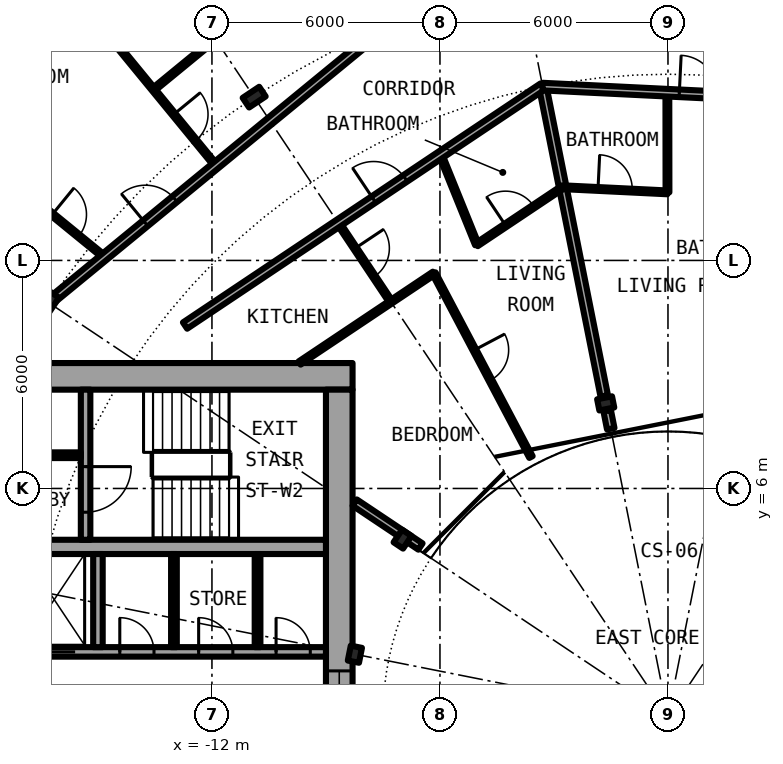
"""IFC4 building model, lengths in metres.
Left out: names, types, materials, properties, quantities, classifications, styles, units other than length and angle.
Written with IfcOpenShell. Run it as: python <this file> out.ifc"""

import sys

from ifc_helpers import new_model, si_unit, direction, frame, frame_2d, origin, origin_2d, place, context, subcontext, project, spatial, rectangle, i_section, extrude, element, fill, save


model = new_model("IFC4")
c1 = context("Model", 3, precision=1e-05, world=origin(), true_north=direction((0.0, 1.0)))
c2 = subcontext(c1, "Body", "Model", "MODEL_VIEW")
j1 = project(units=[si_unit("LENGTHUNIT", "METRE"), si_unit("PLANEANGLEUNIT", "RADIAN")], contexts=[c1])
p1 = place(None, origin())
s1 = spatial("IfcSite", under=j1, at=p1, CompositionType="ELEMENT")
p2 = place(p1, origin())
s2 = spatial("IfcBuilding", under=s1, at=p2, CompositionType="ELEMENT")
p3 = place(p2, frame((0.0, 0.0, 91.05)))
s3 = spatial("IfcBuildingStorey", under=s2, at=p3, CompositionType="ELEMENT", Elevation=91.05)
for number, where, z_axis, x_axis in (
    (1, (-10.889, 16.297, 0.0), (0.0, 0.0, 1.0), (-0.556, 0.831, 0.0)),
    (2, (-16.297, 10.889, 0.0), (0.0, 0.0, 1.0), (-0.831, 0.556, 0.0)),
):
    element("IfcColumn", number, at=place(p3, frame(where, z_axis=z_axis, x_axis=x_axis)), inside=s3, PredefinedType="COLUMN", context=c2, shape_type="SweptSolid", body=[
        extrude(i_section(OverallWidth=0.306, OverallDepth=0.524, WebThickness=0.021, FlangeThickness=0.04, FilletRadius=0.027, at=origin_2d()), origin(), (0.0, 0.0, 1.0), 3.05),
    ])
for number, where, z_axis, x_axis in (
    (3, (-1.639, 8.239, 0.0), (0.0, 0.0, 1.0), (-0.195, 0.981, 0.0)),
    (4, (-6.984, 4.667, 0.0), (0.0, 0.0, 1.0), (-0.831, 0.556, 0.0)),
    (5, (-8.239, 1.639, 0.0), (0.0, 0.0, 1.0), (-0.981, 0.195, 0.0)),
):
    element("IfcColumn", number, at=place(p3, frame(where, z_axis=z_axis, x_axis=x_axis)), inside=s3, PredefinedType="COLUMN", context=c2, shape_type="SweptSolid", body=[
        extrude(i_section(OverallWidth=0.3, OverallDepth=0.4, WebThickness=0.013, FlangeThickness=0.024, FilletRadius=0.027, at=origin_2d()), origin(), (0.0, 0.0, 1.0), 3.05),
    ])
p4 = place(p3, frame((-8.3, 8.95, 0.0), z_axis=(0.0, 0.0, 1.0), x_axis=(-1.0, 0.0, 0.0)))
e6 = element("IfcWall", 6, at=p4, inside=s3, PredefinedType="SHEAR", context=c2, shape_type="SweptSolid", body=[
    extrude(rectangle(XDim=14.0, YDim=0.7, at=frame_2d((7.0, 0.0))), origin(), (0.0, 0.0, 1.0), 3.05),
])
p5 = place(p4, frame((11.575, 0.0, 0.0)))
e7 = element("IfcOpeningElement", 7, at=p5, cuts=e6, PredefinedType="OPENING", context=c2, shape_type="SweptSolid", body=[
    extrude(rectangle(XDim=1.2, YDim=2.3, at=frame_2d((0.6, 1.15))), frame((0.0, 0.36, 0.0), z_axis=(0.0, -1.0, 0.0), x_axis=(1.0, 0.0, 0.0)), (0.0, 0.0, 1.0), 0.72),
])
p6 = place(p3, frame((-8.65, 8.6, 0.0), z_axis=(0.0, 0.0, 1.0), x_axis=(0.0, -1.0, 0.0)))
e8 = element("IfcWall", 8, at=p6, inside=s3, PredefinedType="SHEAR", context=c2, shape_type="SweptSolid", body=[
    extrude(rectangle(XDim=17.2, YDim=0.7, at=frame_2d((8.6, 0.0))), origin(), (0.0, 0.0, 1.0), 3.05),
])
p7 = place(p6, frame((7.4, 0.0, 0.1)))
e9 = element("IfcOpeningElement", 9, at=p7, cuts=e8, PredefinedType="OPENING", context=c2, shape_type="SweptSolid", body=[
    extrude(rectangle(XDim=2.4, YDim=2.2, at=frame_2d((1.2, 1.1))), frame((0.0, 0.36, 0.0), z_axis=(0.0, -1.0, 0.0), x_axis=(1.0, 0.0, 0.0)), (0.0, 0.0, 1.0), 0.72),
])
p8 = place(p3, frame((-19.15, 1.7, 0.0), z_axis=(0.0, 0.0, 1.0), x_axis=(1.0, 0.0, 0.0)))
e10 = element("IfcWall", 10, at=p8, inside=s3, PredefinedType="SHEAR", context=c2, shape_type="SweptSolid", body=[
    extrude(rectangle(XDim=10.15, YDim=0.25, at=frame_2d((5.075, 0.0))), origin(), (0.0, 0.0, 1.0), 3.05),
])
p9 = place(p8, frame((2.45, 0.0, 0.0)))
e11 = element("IfcOpeningElement", 11, at=p9, cuts=e10, PredefinedType="OPENING", context=c2, shape_type="SweptSolid", body=[
    extrude(rectangle(XDim=1.1, YDim=2.3, at=frame_2d((0.55, 1.15))), frame((0.0, 0.135, 0.0), z_axis=(0.0, -1.0, 0.0), x_axis=(1.0, 0.0, 0.0)), (0.0, 0.0, 1.0), 0.27),
])
p10 = place(p8, frame((8.837, 0.0, 0.0)))
e12 = element("IfcOpeningElement", 12, at=p10, cuts=e10, PredefinedType="OPENING", context=c2, shape_type="SweptSolid", body=[
    extrude(rectangle(XDim=0.9, YDim=2.3, at=frame_2d((0.45, 1.15))), frame((0.0, 0.135, 0.0), z_axis=(0.0, -1.0, 0.0), x_axis=(1.0, 0.0, 0.0)), (0.0, 0.0, 1.0), 0.27),
])
p11 = place(p8, frame((6.8, 0.0, 0.0)))
e13 = element("IfcOpeningElement", 13, at=p11, cuts=e10, PredefinedType="OPENING", context=c2, shape_type="SweptSolid", body=[
    extrude(rectangle(XDim=0.9, YDim=2.3, at=frame_2d((0.45, 1.15))), frame((0.0, 0.135, 0.0), z_axis=(0.0, -1.0, 0.0), x_axis=(1.0, 0.0, 0.0)), (0.0, 0.0, 1.0), 0.27),
])
p12 = place(p8, frame((4.725, 0.0, 0.0)))
e14 = element("IfcOpeningElement", 14, at=p12, cuts=e10, PredefinedType="OPENING", context=c2, shape_type="SweptSolid", body=[
    extrude(rectangle(XDim=0.9, YDim=2.3, at=frame_2d((0.45, 1.15))), frame((0.0, 0.135, 0.0), z_axis=(0.0, -1.0, 0.0), x_axis=(1.0, 0.0, 0.0)), (0.0, 0.0, 1.0), 0.27),
])
p13 = place(p3, frame((-9.0, 4.462, 0.0), z_axis=(0.0, 0.0, 1.0), x_axis=(-1.0, 0.0, 0.0)))
e15 = element("IfcWall", 15, at=p13, inside=s3, PredefinedType="SHEAR", context=c2, shape_type="SweptSolid", body=[
    extrude(rectangle(XDim=10.15, YDim=0.375, at=frame_2d((5.075, 0.0))), origin(), (0.0, 0.0, 1.0), 3.05),
])
p14 = place(p3, frame((-15.325, 8.6, 0.0), z_axis=(0.0, 0.0, 1.0), x_axis=(0.0, -1.0, 0.0)))
e16 = element("IfcWall", 16, at=p14, inside=s3, PredefinedType="SHEAR", context=c2, shape_type="SweptSolid", body=[
    extrude(rectangle(XDim=3.95, YDim=0.25, at=frame_2d((1.975, 0.0))), origin(), (0.0, 0.0, 1.0), 3.05),
])
p15 = place(p14, frame((2.025, 0.0, 0.0)))
e17 = element("IfcOpeningElement", 17, at=p15, cuts=e16, PredefinedType="OPENING", context=c2, shape_type="SweptSolid", body=[
    extrude(rectangle(XDim=1.2, YDim=2.3, at=frame_2d((0.6, 1.15))), frame((0.0, 0.135, 0.0), z_axis=(0.0, -1.0, 0.0), x_axis=(1.0, 0.0, 0.0)), (0.0, 0.0, 1.0), 0.27),
])
p16 = place(p3, frame((-15.0, 1.825, 0.0), z_axis=(0.0, 0.0, 1.0), x_axis=(0.0, 1.0, 0.0)))
e18 = element("IfcWall", 18, at=p16, inside=s3, PredefinedType="SOLIDWALL", context=c2, shape_type="SweptSolid", body=[
    extrude(rectangle(XDim=2.45, YDim=0.25, at=frame_2d((1.225, 0.0))), origin(), (0.0, 0.0, 1.0), 2.7),
])
for number, where, z_axis, x_axis in (
    (19, (-10.8, 1.825, 0.0), (0.0, 0.0, 1.0), (0.0, 1.0, 0.0)),
    (20, (-13.0, 1.825, 0.0), (0.0, 0.0, 1.0), (0.0, 1.0, 0.0)),
):
    element("IfcWall", number, at=place(p3, frame(where, z_axis=z_axis, x_axis=x_axis)), inside=s3, PredefinedType="PARTITIONING", context=c2, shape_type="SweptSolid", body=[
        extrude(rectangle(XDim=2.45, YDim=0.15, at=frame_2d((1.225, 0.0))), origin(), (0.0, 0.0, 1.0), 2.7),
    ])
p17 = place(p3, frame((-15.45, 6.875, 0.0), z_axis=(0.0, 0.0, 1.0), x_axis=(-1.0, 0.0, 0.0)))
e21 = element("IfcWall", 21, at=p17, inside=s3, PredefinedType="PARTITIONING", context=c2, shape_type="SweptSolid", body=[
    extrude(rectangle(XDim=3.7, YDim=0.15, at=frame_2d((1.85, 0.0))), origin(), (0.0, 0.0, 1.0), 2.7),
])
p18 = place(p17, frame((1.4, 0.0, 0.0)))
e22 = element("IfcOpeningElement", 22, at=p18, cuts=e21, PredefinedType="OPENING", context=c2, shape_type="SweptSolid", body=[
    extrude(rectangle(XDim=0.9, YDim=2.3, at=frame_2d((0.45, 1.15))), frame((0.0, 0.085, 0.0), z_axis=(0.0, -1.0, 0.0), x_axis=(1.0, 0.0, 0.0)), (0.0, 0.0, 1.0), 0.17),
])
p19 = place(p3, frame((-17.24, 21.007, 0.0), z_axis=(0.0, 0.0, 1.0), x_axis=(0.634396151441, -0.77300810024, 0.0)))
e23 = element("IfcWall", 23, at=p19, inside=s3, PredefinedType="PARTITIONING", context=c2, shape_type="SweptSolid", body=[
    extrude(rectangle(XDim=8.419, YDim=0.1, at=frame_2d((4.209, 0.0))), origin(), (0.0, 0.0, 1.0), 2.7),
])
p20 = place(p19, frame((6.679, 0.0, 0.0)))
e24 = element("IfcOpeningElement", 24, at=p20, cuts=e23, PredefinedType="OPENING", context=c2, shape_type="SweptSolid", body=[
    extrude(rectangle(XDim=0.9, YDim=2.3, at=frame_2d((0.45, 1.15))), frame((0.0, 0.06, 0.0), z_axis=(0.0, -1.0, 0.0), x_axis=(1.0, 0.0, 0.0)), (0.0, 0.0, 1.0), 0.12),
])
p21 = place(p19, frame((2.468, 0.0, 0.0)))
e25 = element("IfcOpeningElement", 25, at=p21, cuts=e23, PredefinedType="OPENING", context=c2, shape_type="SweptSolid", body=[
    extrude(rectangle(XDim=0.9, YDim=2.3, at=frame_2d((0.45, 1.15))), frame((0.0, 0.06, 0.0), z_axis=(0.0, -1.0, 0.0), x_axis=(1.0, 0.0, 0.0)), (0.0, 0.0, 1.0), 0.12),
])
p22 = place(p3, frame((-16.874, 13.758, 0.0), z_axis=(0.0, 0.0, 1.0), x_axis=(0.774979608522, -0.631986239072, 0.0)))
e26 = element("IfcWall", 26, at=p22, inside=s3, PredefinedType="PARTITIONING", context=c2, shape_type="SweptSolid", body=[
    extrude(rectangle(XDim=2.636, YDim=0.1, at=frame_2d((1.318, 0.0))), origin(), (0.0, 0.0, 1.0), 2.7),
])
p23 = place(p22, frame((0.868, 0.0, 0.0)))
e27 = element("IfcOpeningElement", 27, at=p23, cuts=e26, PredefinedType="OPENING", context=c2, shape_type="SweptSolid", body=[
    extrude(rectangle(XDim=0.9, YDim=2.3, at=frame_2d((0.45, 1.15))), frame((0.0, 0.06, 0.0), z_axis=(0.0, -1.0, 0.0), x_axis=(1.0, 0.0, 0.0)), (0.0, 0.0, 1.0), 0.12),
])
p24 = place(p3, frame((-8.674, 12.982, 0.0), z_axis=(0.0, 0.0, 1.0), x_axis=(0.555355163998, -0.831613276602, 0.0)))
e28 = element("IfcWall", 28, at=p24, inside=s3, PredefinedType="PARTITIONING", context=c2, shape_type="SweptSolid", body=[
    extrude(rectangle(XDim=2.494, YDim=0.1, at=frame_2d((1.247, 0.0))), origin(), (0.0, 0.0, 1.0), 2.7),
])
p25 = place(p24, frame((0.797, 0.0, 0.0)))
e29 = element("IfcOpeningElement", 29, at=p25, cuts=e28, PredefinedType="OPENING", context=c2, shape_type="SweptSolid", body=[
    extrude(rectangle(XDim=0.9, YDim=2.3, at=frame_2d((0.45, 1.15))), frame((0.0, 0.06, 0.0), z_axis=(0.0, -1.0, 0.0), x_axis=(1.0, 0.0, 0.0)), (0.0, 0.0, 1.0), 0.12),
])
p26 = place(p3, frame((-6.159, 11.663, 0.0), z_axis=(0.0, 0.0, 1.0), x_axis=(0.466976820365, -0.884269556889, 0.0)))
e30 = element("IfcWall", 30, at=p26, inside=s3, PredefinedType="PARTITIONING", context=c2, shape_type="SweptSolid", body=[
    extrude(rectangle(XDim=5.469, YDim=0.1, at=frame_2d((2.735, 0.0))), origin(), (0.0, 0.0, 1.0), 2.7),
])
p27 = place(p26, frame((2.284, 0.0, 0.0)))
e31 = element("IfcOpeningElement", 31, at=p27, cuts=e30, PredefinedType="OPENING", context=c2, shape_type="SweptSolid", body=[
    extrude(rectangle(XDim=0.9, YDim=2.3, at=frame_2d((0.45, 1.15))), frame((0.0, 0.06, 0.0), z_axis=(0.0, -1.0, 0.0), x_axis=(1.0, 0.0, 0.0)), (0.0, 0.0, 1.0), 0.12),
])
p28 = place(p3, frame((-5.986, 14.779, 0.0), z_axis=(0.0, 0.0, 1.0), x_axis=(0.375649498413, -0.926761811008, 0.0)))
e32 = element("IfcWall", 32, at=p28, inside=s3, PredefinedType="PARTITIONING", context=c2, shape_type="SweptSolid", body=[
    extrude(rectangle(XDim=2.548, YDim=0.1, at=frame_2d((1.274, 0.0))), origin(), (0.0, 0.0, 1.0), 2.7),
])
p29 = place(p3, frame((-3.297, 16.575, 0.0), z_axis=(0.0, 0.0, 1.0), x_axis=(0.195205282633, -0.980762406311, 0.0)))
e33 = element("IfcWall", 33, at=p29, inside=s3, PredefinedType="PARTITIONING", context=c2, shape_type="SweptSolid", body=[
    extrude(rectangle(XDim=8.3, YDim=0.2, at=frame_2d((4.15, 0.0))), origin(), (0.0, 0.0, 1.0), 2.7),
])
p30 = place(p3, frame((-1.599, 8.043, 0.0), z_axis=(0.0, 0.0, 1.0), x_axis=(0.193768289311, -0.981047323047, 0.0)))
e34 = element("IfcWall", 34, at=p30, inside=s3, PredefinedType="PARTITIONING", context=c2, shape_type="SweptSolid", body=[
    extrude(rectangle(XDim=0.48, YDim=0.2, at=frame_2d((0.24, 0.0))), origin(), (0.0, 0.0, 1.0), 2.7),
])
p31 = place(p3, frame((-0.013, 13.792, 0.0), z_axis=(0.0, 0.0, 1.0), x_axis=(-0.001210427419, 0.999999267432, 0.0)))
e35 = element("IfcWall", 35, at=p31, inside=s3, PredefinedType="PARTITIONING", context=c2, shape_type="SweptSolid", body=[
    extrude(rectangle(XDim=2.622, YDim=0.1, at=frame_2d((1.311, 0.0))), origin(), (0.0, 0.0, 1.0), 2.7),
])
p32 = place(p3, frame((-6.513, 4.472, 0.0), z_axis=(0.0, 0.0, 1.0), x_axis=(-0.831382204863, 0.555701025225, 0.0)))
e36 = element("IfcWall", 36, at=p32, inside=s3, PredefinedType="PARTITIONING", context=c2, shape_type="SweptSolid", body=[
    extrude(rectangle(XDim=2.082, YDim=0.2, at=frame_2d((1.041, 0.0))), origin(), (0.0, 0.0, 1.0), 2.7),
])
p33 = place(p3, frame((-9.695, 9.3, 0.0), z_axis=(0.0, 0.0, 1.0), x_axis=(0.831369521678, 0.555720000022, 0.0)))
e37 = element("IfcWall", 37, at=p33, inside=s3, PredefinedType="PARTITIONING", context=c2, shape_type="SweptSolid", body=[
    extrude(rectangle(XDim=4.252, YDim=0.1, at=frame_2d((2.126, 0.0))), origin(), (0.0, 0.0, 1.0), 2.7),
])
p34 = place(p3, frame((-5.032, 12.417, 0.0), z_axis=(0.0, 0.0, 1.0), x_axis=(0.831538390496, 0.555467285384, 0.0)))
e38 = element("IfcWall", 38, at=p34, inside=s3, PredefinedType="PARTITIONING", context=c2, shape_type="SweptSolid", body=[
    extrude(rectangle(XDim=2.717, YDim=0.1, at=frame_2d((1.358, 0.0))), origin(), (0.0, 0.0, 1.0), 2.7),
])
p35 = place(p34, frame((0.911, 0.0, 0.0)))
e39 = element("IfcOpeningElement", 39, at=p35, cuts=e38, PredefinedType="OPENING", context=c2, shape_type="SweptSolid", body=[
    extrude(rectangle(XDim=0.9, YDim=2.3, at=frame_2d((0.45, 1.15))), frame((0.0, 0.06, 0.0), z_axis=(0.0, -1.0, 0.0), x_axis=(1.0, 0.0, 0.0)), (0.0, 0.0, 1.0), 0.12),
])
p36 = place(p3, frame((-2.77, 13.926, 0.0), z_axis=(0.0, 0.0, 1.0), x_axis=(0.99880320044, -0.048909782152, 0.0)))
e40 = element("IfcWall", 40, at=p36, inside=s3, PredefinedType="PARTITIONING", context=c2, shape_type="SweptSolid", body=[
    extrude(rectangle(XDim=2.76, YDim=0.1, at=frame_2d((1.38, 0.0))), origin(), (0.0, 0.0, 1.0), 2.7),
])
p37 = place(p36, frame((0.93, 0.0, 0.0)))
e41 = element("IfcOpeningElement", 41, at=p37, cuts=e40, PredefinedType="OPENING", context=c2, shape_type="SweptSolid", body=[
    extrude(rectangle(XDim=0.9, YDim=2.3, at=frame_2d((0.45, 1.15))), frame((0.0, 0.06, 0.0), z_axis=(0.0, -1.0, 0.0), x_axis=(1.0, 0.0, 0.0)), (0.0, 0.0, 1.0), 0.12),
])
p38 = place(p3, frame((-12.708, 10.286, 0.0), z_axis=(0.0, 0.0, 1.0), x_axis=(0.831405725802, 0.555665834026, 0.0)))
e42 = element("IfcWall", 42, at=p38, inside=s3, PredefinedType="PARTITIONING", context=c2, shape_type="SweptSolid", body=[
    extrude(rectangle(XDim=11.314, YDim=0.2, at=frame_2d((5.657, 0.0))), origin(), (0.0, 0.0, 1.0), 2.7),
])
p39 = place(p38, frame((5.969, 0.0, 0.0)))
e43 = element("IfcOpeningElement", 43, at=p39, cuts=e42, PredefinedType="OPENING", context=c2, shape_type="SweptSolid", body=[
    extrude(rectangle(XDim=1.0, YDim=2.3, at=frame_2d((0.5, 1.15))), frame((0.0, 0.11, 0.0), z_axis=(0.0, -1.0, 0.0), x_axis=(1.0, 0.0, 0.0)), (0.0, 0.0, 1.0), 0.22),
])
p40 = place(p3, frame((-3.298, 16.574, 0.0), z_axis=(0.0, 0.0, 1.0), x_axis=(0.998802523271, -0.048923608895, 0.0)))
e44 = element("IfcWall", 44, at=p40, inside=s3, PredefinedType="PARTITIONING", context=c2, shape_type="SweptSolid", body=[
    extrude(rectangle(XDim=8.214, YDim=0.2, at=frame_2d((4.107, 0.0))), origin(), (0.0, 0.0, 1.0), 2.7),
])
p41 = place(p40, frame((3.6, 0.0, 0.0)))
e45 = element("IfcOpeningElement", 45, at=p41, cuts=e44, PredefinedType="OPENING", context=c2, shape_type="SweptSolid", body=[
    extrude(rectangle(XDim=1.0, YDim=2.3, at=frame_2d((0.5, 1.15))), frame((0.0, 0.11, 0.0), z_axis=(0.0, -1.0, 0.0), x_axis=(1.0, 0.0, 0.0)), (0.0, 0.0, 1.0), 0.22),
])
p42 = place(p3, frame((-0.007, 19.599, 0.0), z_axis=(0.0, 0.0, 1.0), x_axis=(0.95700958731, -0.290056287291, 0.0)))
e46 = element("IfcWall", 46, at=p42, inside=s3, PredefinedType="PARTITIONING", context=c2, shape_type="SweptSolid", body=[
    extrude(rectangle(XDim=11.226, YDim=0.2, at=frame_2d((5.613, 0.0))), origin(), (0.0, 0.0, 1.0), 2.38),
])
p43 = place(p42, frame((7.093, 0.0, 0.0)))
e47 = element("IfcOpeningElement", 47, at=p43, cuts=e46, PredefinedType="OPENING", context=c2, shape_type="SweptSolid", body=[
    extrude(rectangle(XDim=1.0, YDim=2.3, at=frame_2d((0.5, 1.15))), frame((0.0, 0.11, 0.0), z_axis=(0.0, -1.0, 0.0), x_axis=(1.0, 0.0, 0.0)), (0.0, 0.0, 1.0), 0.22),
])
p44 = place(p3, frame((-16.173, 10.991, 0.0), z_axis=(0.0, 0.0, 1.0), x_axis=(0.773049018445, 0.634346289562, 0.0)))
e48 = element("IfcWall", 48, at=p44, inside=s3, PredefinedType="PARTITIONING", context=c2, shape_type="SweptSolid", body=[
    extrude(rectangle(XDim=11.219, YDim=0.2, at=frame_2d((5.61, 0.0))), origin(), (0.0, 0.0, 1.0), 2.38),
])
p45 = place(p44, frame((3.135, 0.0, 0.0)))
e49 = element("IfcOpeningElement", 49, at=p45, cuts=e48, PredefinedType="OPENING", context=c2, shape_type="SweptSolid", body=[
    extrude(rectangle(XDim=1.0, YDim=2.3, at=frame_2d((0.5, 1.15))), frame((0.0, 0.11, 0.0), z_axis=(0.0, -1.0, 0.0), x_axis=(1.0, 0.0, 0.0)), (0.0, 0.0, 1.0), 0.22),
])
p46 = place(p3, frame((-13.538, 16.496, 0.0), z_axis=(0.0, 0.0, 1.0), x_axis=(0.773000340237, 0.634405606843, 0.0)))
e50 = element("IfcWall", 50, at=p46, inside=s3, PredefinedType="PARTITIONING", context=c2, shape_type="SweptSolid", body=[
    extrude(rectangle(XDim=6.474, YDim=0.1, at=frame_2d((3.237, 0.0))), origin(), (0.0, 0.0, 1.0), 2.7),
])
p47 = place(p9, origin())
e51 = element("IfcDoor", 51, at=p47, inside=s3, OperationType="DOUBLE_DOOR_SLIDING", PredefinedType="DOOR", context=c2, shape_type="SweptSolid", body=[
    extrude(rectangle(XDim=1.1, YDim=2.3, at=frame_2d((0.55, 1.15))), frame((0.0, 0.025, 0.0), z_axis=(0.0, -1.0, 0.0), x_axis=(1.0, 0.0, 0.0)), (0.0, 0.0, 1.0), 0.05),
])
fill(e11, e51)
p48 = place(p10, origin())
e52 = element("IfcDoor", 52, at=p48, inside=s3, OperationType="SINGLE_SWING_LEFT", PredefinedType="DOOR", context=c2, shape_type="SweptSolid", body=[
    extrude(rectangle(XDim=0.9, YDim=2.3, at=frame_2d((0.45, 1.15))), frame((0.0, 0.025, 0.0), z_axis=(0.0, -1.0, 0.0), x_axis=(1.0, 0.0, 0.0)), (0.0, 0.0, 1.0), 0.05),
])
fill(e12, e52)
p49 = place(p11, origin())
e53 = element("IfcDoor", 53, at=p49, inside=s3, OperationType="SINGLE_SWING_LEFT", PredefinedType="DOOR", context=c2, shape_type="SweptSolid", body=[
    extrude(rectangle(XDim=0.9, YDim=2.3, at=frame_2d((0.45, 1.15))), frame((0.0, 0.025, 0.0), z_axis=(0.0, -1.0, 0.0), x_axis=(1.0, 0.0, 0.0)), (0.0, 0.0, 1.0), 0.05),
])
fill(e13, e53)
p50 = place(p12, origin())
e54 = element("IfcDoor", 54, at=p50, inside=s3, OperationType="SINGLE_SWING_LEFT", PredefinedType="DOOR", context=c2, shape_type="SweptSolid", body=[
    extrude(rectangle(XDim=0.9, YDim=2.3, at=frame_2d((0.45, 1.15))), frame((0.0, 0.025, 0.0), z_axis=(0.0, -1.0, 0.0), x_axis=(1.0, 0.0, 0.0)), (0.0, 0.0, 1.0), 0.05),
])
fill(e14, e54)
p51 = place(p15, origin())
e55 = element("IfcDoor", 55, at=p51, inside=s3, OperationType="SINGLE_SWING_LEFT", PredefinedType="DOOR", context=c2, shape_type="SweptSolid", body=[
    extrude(rectangle(XDim=1.2, YDim=2.3, at=frame_2d((0.6, 1.15))), frame((0.0, 0.025, 0.0), z_axis=(0.0, -1.0, 0.0), x_axis=(1.0, 0.0, 0.0)), (0.0, 0.0, 1.0), 0.05),
])
fill(e17, e55)
p52 = place(p7, origin())
e56 = element("IfcWindow", 56, at=p52, inside=s3, PartitioningType="SINGLE_PANEL", PredefinedType="WINDOW", context=c2, shape_type="SweptSolid", body=[
    extrude(rectangle(XDim=2.4, YDim=2.2, at=frame_2d((1.2, 1.1))), frame((0.0, 0.03, 0.0), z_axis=(0.0, -1.0, 0.0), x_axis=(1.0, 0.0, 0.0)), (0.0, 0.0, 1.0), 0.06),
])
fill(e9, e56)
p53 = place(p45, origin())
e57 = element("IfcDoor", 57, at=p53, inside=s3, OperationType="SINGLE_SWING_LEFT", PredefinedType="DOOR", context=c2, shape_type="SweptSolid", body=[
    extrude(rectangle(XDim=1.0, YDim=2.3, at=frame_2d((0.5, 1.15))), frame((0.0, 0.025, 0.0), z_axis=(0.0, -1.0, 0.0), x_axis=(1.0, 0.0, 0.0)), (0.0, 0.0, 1.0), 0.05),
])
fill(e49, e57)
p54 = place(p23, origin())
e58 = element("IfcDoor", 58, at=p54, inside=s3, OperationType="SINGLE_SWING_LEFT", PredefinedType="DOOR", context=c2, shape_type="SweptSolid", body=[
    extrude(rectangle(XDim=0.9, YDim=2.3, at=frame_2d((0.45, 1.15))), frame((0.0, 0.025, 0.0), z_axis=(0.0, -1.0, 0.0), x_axis=(1.0, 0.0, 0.0)), (0.0, 0.0, 1.0), 0.05),
])
fill(e27, e58)
p55 = place(p20, origin())
e59 = element("IfcDoor", 59, at=p55, inside=s3, OperationType="SINGLE_SWING_RIGHT", PredefinedType="DOOR", context=c2, shape_type="SweptSolid", body=[
    extrude(rectangle(XDim=0.9, YDim=2.3, at=frame_2d((0.45, 1.15))), frame((0.0, 0.025, 0.0), z_axis=(0.0, -1.0, 0.0), x_axis=(1.0, 0.0, 0.0)), (0.0, 0.0, 1.0), 0.05),
])
fill(e24, e59)
p56 = place(p41, origin())
e60 = element("IfcDoor", 60, at=p56, inside=s3, OperationType="SINGLE_SWING_LEFT", PredefinedType="DOOR", context=c2, shape_type="SweptSolid", body=[
    extrude(rectangle(XDim=1.0, YDim=2.3, at=frame_2d((0.5, 1.15))), frame((0.0, 0.025, 0.0), z_axis=(0.0, -1.0, 0.0), x_axis=(1.0, 0.0, 0.0)), (0.0, 0.0, 1.0), 0.05),
])
fill(e45, e60)
p57 = place(p37, origin())
e61 = element("IfcDoor", 61, at=p57, inside=s3, OperationType="SINGLE_SWING_LEFT", PredefinedType="DOOR", context=c2, shape_type="SweptSolid", body=[
    extrude(rectangle(XDim=0.9, YDim=2.3, at=frame_2d((0.45, 1.15))), frame((0.0, 0.025, 0.0), z_axis=(0.0, -1.0, 0.0), x_axis=(1.0, 0.0, 0.0)), (0.0, 0.0, 1.0), 0.05),
])
fill(e41, e61)
p58 = place(p39, origin())
e62 = element("IfcDoor", 62, at=p58, inside=s3, OperationType="SINGLE_SWING_RIGHT", PredefinedType="DOOR", context=c2, shape_type="SweptSolid", body=[
    extrude(rectangle(XDim=1.0, YDim=2.3, at=frame_2d((0.5, 1.15))), frame((0.0, 0.025, 0.0), z_axis=(0.0, -1.0, 0.0), x_axis=(1.0, 0.0, 0.0)), (0.0, 0.0, 1.0), 0.05),
])
fill(e43, e62)
p59 = place(p35, origin())
e63 = element("IfcDoor", 63, at=p59, inside=s3, OperationType="SINGLE_SWING_RIGHT", PredefinedType="DOOR", context=c2, shape_type="SweptSolid", body=[
    extrude(rectangle(XDim=0.9, YDim=2.3, at=frame_2d((0.45, 1.15))), frame((0.0, 0.025, 0.0), z_axis=(0.0, -1.0, 0.0), x_axis=(1.0, 0.0, 0.0)), (0.0, 0.0, 1.0), 0.05),
])
fill(e39, e63)
p60 = place(p25, origin())
e64 = element("IfcDoor", 64, at=p60, inside=s3, OperationType="SINGLE_SWING_RIGHT", PredefinedType="DOOR", context=c2, shape_type="SweptSolid", body=[
    extrude(rectangle(XDim=0.9, YDim=2.3, at=frame_2d((0.45, 1.15))), frame((0.0, 0.025, 0.0), z_axis=(0.0, -1.0, 0.0), x_axis=(1.0, 0.0, 0.0)), (0.0, 0.0, 1.0), 0.05),
])
fill(e29, e64)
p61 = place(p27, origin())
e65 = element("IfcDoor", 65, at=p61, inside=s3, OperationType="SINGLE_SWING_RIGHT", PredefinedType="DOOR", context=c2, shape_type="SweptSolid", body=[
    extrude(rectangle(XDim=0.9, YDim=2.3, at=frame_2d((0.45, 1.15))), frame((0.0, 0.025, 0.0), z_axis=(0.0, -1.0, 0.0), x_axis=(1.0, 0.0, 0.0)), (0.0, 0.0, 1.0), 0.05),
])
fill(e31, e65)
save(model, sys.argv[1])
